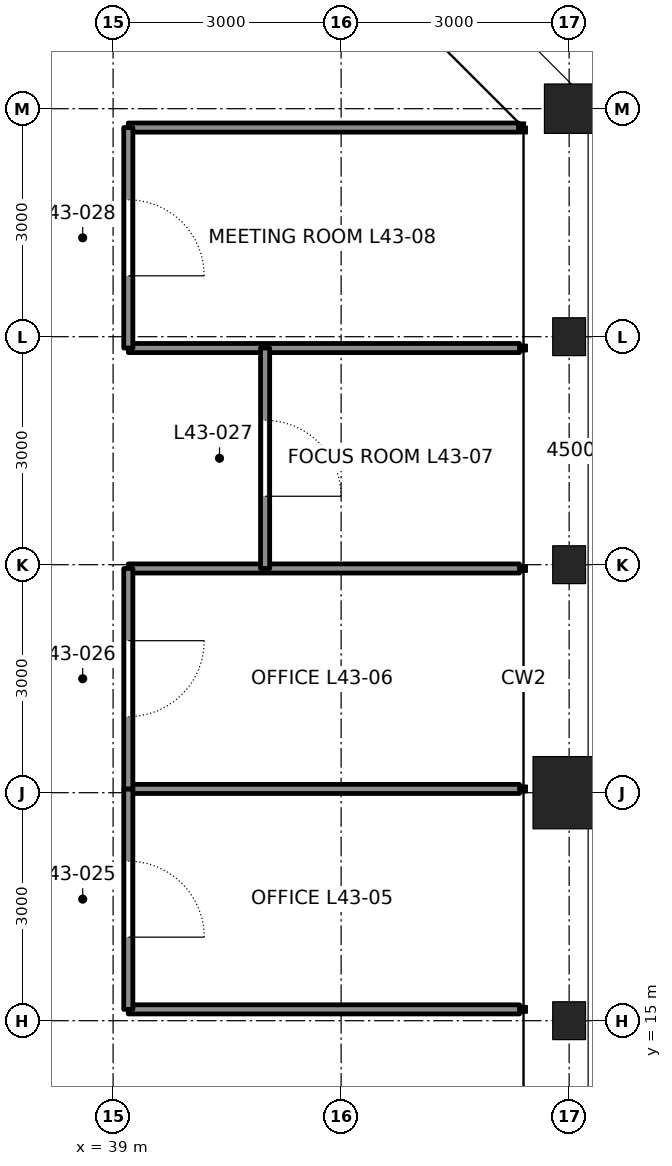
"""IFC4 building model, lengths in metres.
Left out: names, types, materials, properties, quantities, classifications, styles, units other than length and angle.
Written with IfcOpenShell. Run it as: python <this file> out.ifc"""

import sys

from ifc_helpers import new_model, si_unit, direction, frame, frame_2d, origin, origin_2d, place, context, subcontext, project, spatial, rectangle, hollow_rectangle, i_section, extrude, element, fill, save


model = new_model("IFC4")
c1 = context("Model", 3, precision=1e-05, world=origin(), true_north=direction((0.0, 1.0)))
c2 = subcontext(c1, "Body", "Model", "MODEL_VIEW")
j1 = project(units=[si_unit("LENGTHUNIT", "METRE"), si_unit("PLANEANGLEUNIT", "RADIAN")], contexts=[c1])
p1 = place(None, origin())
s1 = spatial("IfcSite", under=j1, at=p1, CompositionType="ELEMENT")
p2 = place(p1, origin())
s2 = spatial("IfcBuilding", under=s1, at=p2, CompositionType="ELEMENT")
p3 = place(p2, frame((0.0, 0.0, 197.1)))
s3 = spatial("IfcBuildingStorey", under=s2, at=p3, CompositionType="ELEMENT", Elevation=197.1)
p4 = place(p3, frame((45.0, 15.0, 0.0), z_axis=(0.0, 0.0, 1.0), x_axis=(1.0, 0.0, 0.0)))
e1 = element("IfcColumn", 1, at=p4, inside=s3, PredefinedType="COLUMN", context=c2, shape_type="SweptSolid", body=[
    extrude(i_section(OverallWidth=0.432, OverallDepth=0.498, WebThickness=0.056, FlangeThickness=0.089, at=origin_2d()), origin(), (0.0, 0.0, 1.0), 4.2),
])
p5 = place(p3, frame((45.0, 18.0, 0.0), z_axis=(0.0, 0.0, 1.0), x_axis=(1.0, 0.0, 0.0)))
e2 = element("IfcColumn", 2, at=p5, inside=s3, PredefinedType="COLUMN", context=c2, shape_type="SweptSolid", body=[
    extrude(hollow_rectangle(XDim=0.95, YDim=0.95, WallThickness=0.11, at=origin_2d()), origin(), (0.0, 0.0, 1.0), 4.2),
])
for number, where, z_axis, x_axis in (
    (3, (45.0, 21.0, 0.0), (0.0, 0.0, 1.0), (1.0, 0.0, 0.0)),
    (4, (45.0, 24.0, 0.0), (0.0, 0.0, 1.0), (1.0, 0.0, 0.0)),
):
    element("IfcColumn", number, at=place(p3, frame(where, z_axis=z_axis, x_axis=x_axis)), inside=s3, PredefinedType="COLUMN", context=c2, shape_type="SweptSolid", body=[
        extrude(i_section(OverallWidth=0.432, OverallDepth=0.498, WebThickness=0.056, FlangeThickness=0.089, at=origin_2d()), origin(), (0.0, 0.0, 1.0), 4.2),
    ])
p6 = place(p3, frame((45.0, 27.0, 0.0), z_axis=(0.0, 0.0, 1.0), x_axis=(1.0, 0.0, 0.0)))
e5 = element("IfcColumn", 5, at=p6, inside=s3, PredefinedType="COLUMN", context=c2, shape_type="SweptSolid", body=[
    extrude(hollow_rectangle(XDim=0.65, YDim=0.65, WallThickness=0.065, at=origin_2d()), origin(), (0.0, 0.0, 1.0), 4.2),
])
p7 = place(p3, frame((44.347, 15.149, 0.0), z_axis=(0.0, 0.0, 1.0), x_axis=(-1.0, 0.0, 0.0)))
e6 = element("IfcWall", 6, at=p7, inside=s3, PredefinedType="PARTITIONING", context=c2, shape_type="SweptSolid", body=[
    extrude(rectangle(XDim=5.147, YDim=0.12, at=frame_2d((2.574, 0.0))), origin(), (0.0, 0.0, 1.0), 4.04),
])
for number, where, z_axis, x_axis in (
    (7, (44.347, 18.05, 0.0), (0.0, 0.0, 1.0), (-1.0, 0.0, 0.0)),
    (8, (44.347, 20.95, 0.0), (0.0, 0.0, 1.0), (-1.0, 0.0, 0.0)),
):
    element("IfcWall", number, at=place(p3, frame(where, z_axis=z_axis, x_axis=x_axis)), inside=s3, PredefinedType="PARTITIONING", context=c2, shape_type="SweptSolid", body=[
        extrude(rectangle(XDim=5.147, YDim=0.12, at=frame_2d((2.574, 0.0))), origin(), (0.0, 0.0, 1.0), 3.357),
    ])
p8 = place(p3, frame((44.347, 23.851, 0.0), z_axis=(0.0, 0.0, 1.0), x_axis=(-1.0, 0.0, 0.0)))
e9 = element("IfcWall", 9, at=p8, inside=s3, PredefinedType="PARTITIONING", context=c2, shape_type="SweptSolid", body=[
    extrude(rectangle(XDim=5.147, YDim=0.12, at=frame_2d((2.574, 0.0))), origin(), (0.0, 0.0, 1.0), 4.04),
])
p9 = place(p3, frame((44.334, 26.751, 0.0), z_axis=(0.0, 0.0, 1.0), x_axis=(-1.0, 0.0, 0.0)))
e10 = element("IfcWall", 10, at=p9, inside=s3, PredefinedType="PARTITIONING", context=c2, shape_type="SweptSolid", body=[
    extrude(rectangle(XDim=5.134, YDim=0.12, at=frame_2d((2.567, 0.0))), origin(), (0.0, 0.0, 1.0), 4.04),
])
p10 = place(p3, frame((39.2, 15.149, 0.0), z_axis=(0.0, 0.0, 1.0), x_axis=(0.0, 1.0, 0.0)))
e11 = element("IfcWall", 11, at=p10, inside=s3, PredefinedType="PARTITIONING", context=c2, shape_type="SweptSolid", body=[
    extrude(rectangle(XDim=2.901, YDim=0.12, at=frame_2d((1.45, 0.0))), origin(), (0.0, 0.0, 1.0), 4.04),
])
p11 = place(p10, frame((0.95, 0.0, 0.0)))
e12 = element("IfcOpeningElement", 12, at=p11, cuts=e11, PredefinedType="OPENING", context=c2, shape_type="SweptSolid", body=[
    extrude(rectangle(XDim=1.0, YDim=2.4, at=frame_2d((0.5, 1.2))), frame((0.0, 0.07, 0.0), z_axis=(0.0, -1.0, 0.0), x_axis=(1.0, 0.0, 0.0)), (0.0, 0.0, 1.0), 0.14),
])
p12 = place(p3, frame((39.2, 18.05, 0.0), z_axis=(0.0, 0.0, 1.0), x_axis=(0.0, 1.0, 0.0)))
e13 = element("IfcWall", 13, at=p12, inside=s3, PredefinedType="PARTITIONING", context=c2, shape_type="SweptSolid", body=[
    extrude(rectangle(XDim=2.9, YDim=0.12, at=frame_2d((1.45, 0.0))), origin(), (0.0, 0.0, 1.0), 4.04),
])
p13 = place(p12, frame((0.95, 0.0, 0.0)))
e14 = element("IfcOpeningElement", 14, at=p13, cuts=e13, PredefinedType="OPENING", context=c2, shape_type="SweptSolid", body=[
    extrude(rectangle(XDim=1.0, YDim=2.4, at=frame_2d((0.5, 1.2))), frame((0.0, 0.07, 0.0), z_axis=(0.0, -1.0, 0.0), x_axis=(1.0, 0.0, 0.0)), (0.0, 0.0, 1.0), 0.14),
])
p14 = place(p3, frame((41.0, 20.95, 0.0), z_axis=(0.0, 0.0, 1.0), x_axis=(0.0, 1.0, 0.0)))
e15 = element("IfcWall", 15, at=p14, inside=s3, PredefinedType="PARTITIONING", context=c2, shape_type="SweptSolid", body=[
    extrude(rectangle(XDim=2.901, YDim=0.12, at=frame_2d((1.45, 0.0))), origin(), (0.0, 0.0, 1.0), 4.04),
])
p15 = place(p14, frame((0.95, 0.0, 0.0)))
e16 = element("IfcOpeningElement", 16, at=p15, cuts=e15, PredefinedType="OPENING", context=c2, shape_type="SweptSolid", body=[
    extrude(rectangle(XDim=1.0, YDim=2.4, at=frame_2d((0.5, 1.2))), frame((0.0, 0.07, 0.0), z_axis=(0.0, -1.0, 0.0), x_axis=(1.0, 0.0, 0.0)), (0.0, 0.0, 1.0), 0.14),
])
p16 = place(p3, frame((39.2, 23.851, 0.0), z_axis=(0.0, 0.0, 1.0), x_axis=(0.0, 1.0, 0.0)))
e17 = element("IfcWall", 17, at=p16, inside=s3, PredefinedType="PARTITIONING", context=c2, shape_type="SweptSolid", body=[
    extrude(rectangle(XDim=2.901, YDim=0.12, at=frame_2d((1.45, 0.0))), origin(), (0.0, 0.0, 1.0), 4.04),
])
p17 = place(p16, frame((0.95, 0.0, 0.0)))
e18 = element("IfcOpeningElement", 18, at=p17, cuts=e17, PredefinedType="OPENING", context=c2, shape_type="SweptSolid", body=[
    extrude(rectangle(XDim=1.0, YDim=2.4, at=frame_2d((0.5, 1.2))), frame((0.0, 0.07, 0.0), z_axis=(0.0, -1.0, 0.0), x_axis=(1.0, 0.0, 0.0)), (0.0, 0.0, 1.0), 0.14),
])
p18 = place(p11, frame((1.0, 0.0, 0.0), z_axis=(0.0, 0.0, 1.0), x_axis=(-1.0, 0.0, 0.0)))
e19 = element("IfcDoor", 19, at=p18, inside=s3, OperationType="SINGLE_SWING_RIGHT", PredefinedType="DOOR", context=c2, shape_type="SweptSolid", body=[
    extrude(rectangle(XDim=1.0, YDim=2.4, at=frame_2d((0.5, 1.2))), frame((0.0, 0.025, 0.0), z_axis=(0.0, -1.0, 0.0), x_axis=(1.0, 0.0, 0.0)), (0.0, 0.0, 1.0), 0.05),
])
fill(e12, e19)
p19 = place(p13, frame((1.0, 0.0, 0.0), z_axis=(0.0, 0.0, 1.0), x_axis=(-1.0, 0.0, 0.0)))
e20 = element("IfcDoor", 20, at=p19, inside=s3, OperationType="SINGLE_SWING_LEFT", PredefinedType="DOOR", context=c2, shape_type="SweptSolid", body=[
    extrude(rectangle(XDim=1.0, YDim=2.4, at=frame_2d((0.5, 1.2))), frame((0.0, 0.025, 0.0), z_axis=(0.0, -1.0, 0.0), x_axis=(1.0, 0.0, 0.0)), (0.0, 0.0, 1.0), 0.05),
])
fill(e14, e20)
p20 = place(p15, frame((1.0, 0.0, 0.0), z_axis=(0.0, 0.0, 1.0), x_axis=(-1.0, 0.0, 0.0)))
e21 = element("IfcDoor", 21, at=p20, inside=s3, OperationType="SINGLE_SWING_RIGHT", PredefinedType="DOOR", context=c2, shape_type="SweptSolid", body=[
    extrude(rectangle(XDim=1.0, YDim=2.4, at=frame_2d((0.5, 1.2))), frame((0.0, 0.025, 0.0), z_axis=(0.0, -1.0, 0.0), x_axis=(1.0, 0.0, 0.0)), (0.0, 0.0, 1.0), 0.05),
])
fill(e16, e21)
p21 = place(p17, frame((1.0, 0.0, 0.0), z_axis=(0.0, 0.0, 1.0), x_axis=(-1.0, 0.0, 0.0)))
e22 = element("IfcDoor", 22, at=p21, inside=s3, OperationType="SINGLE_SWING_RIGHT", PredefinedType="DOOR", context=c2, shape_type="SweptSolid", body=[
    extrude(rectangle(XDim=1.0, YDim=2.4, at=frame_2d((0.5, 1.2))), frame((0.0, 0.025, 0.0), z_axis=(0.0, -1.0, 0.0), x_axis=(1.0, 0.0, 0.0)), (0.0, 0.0, 1.0), 0.05),
])
fill(e18, e22)
save(model, sys.argv[1])
